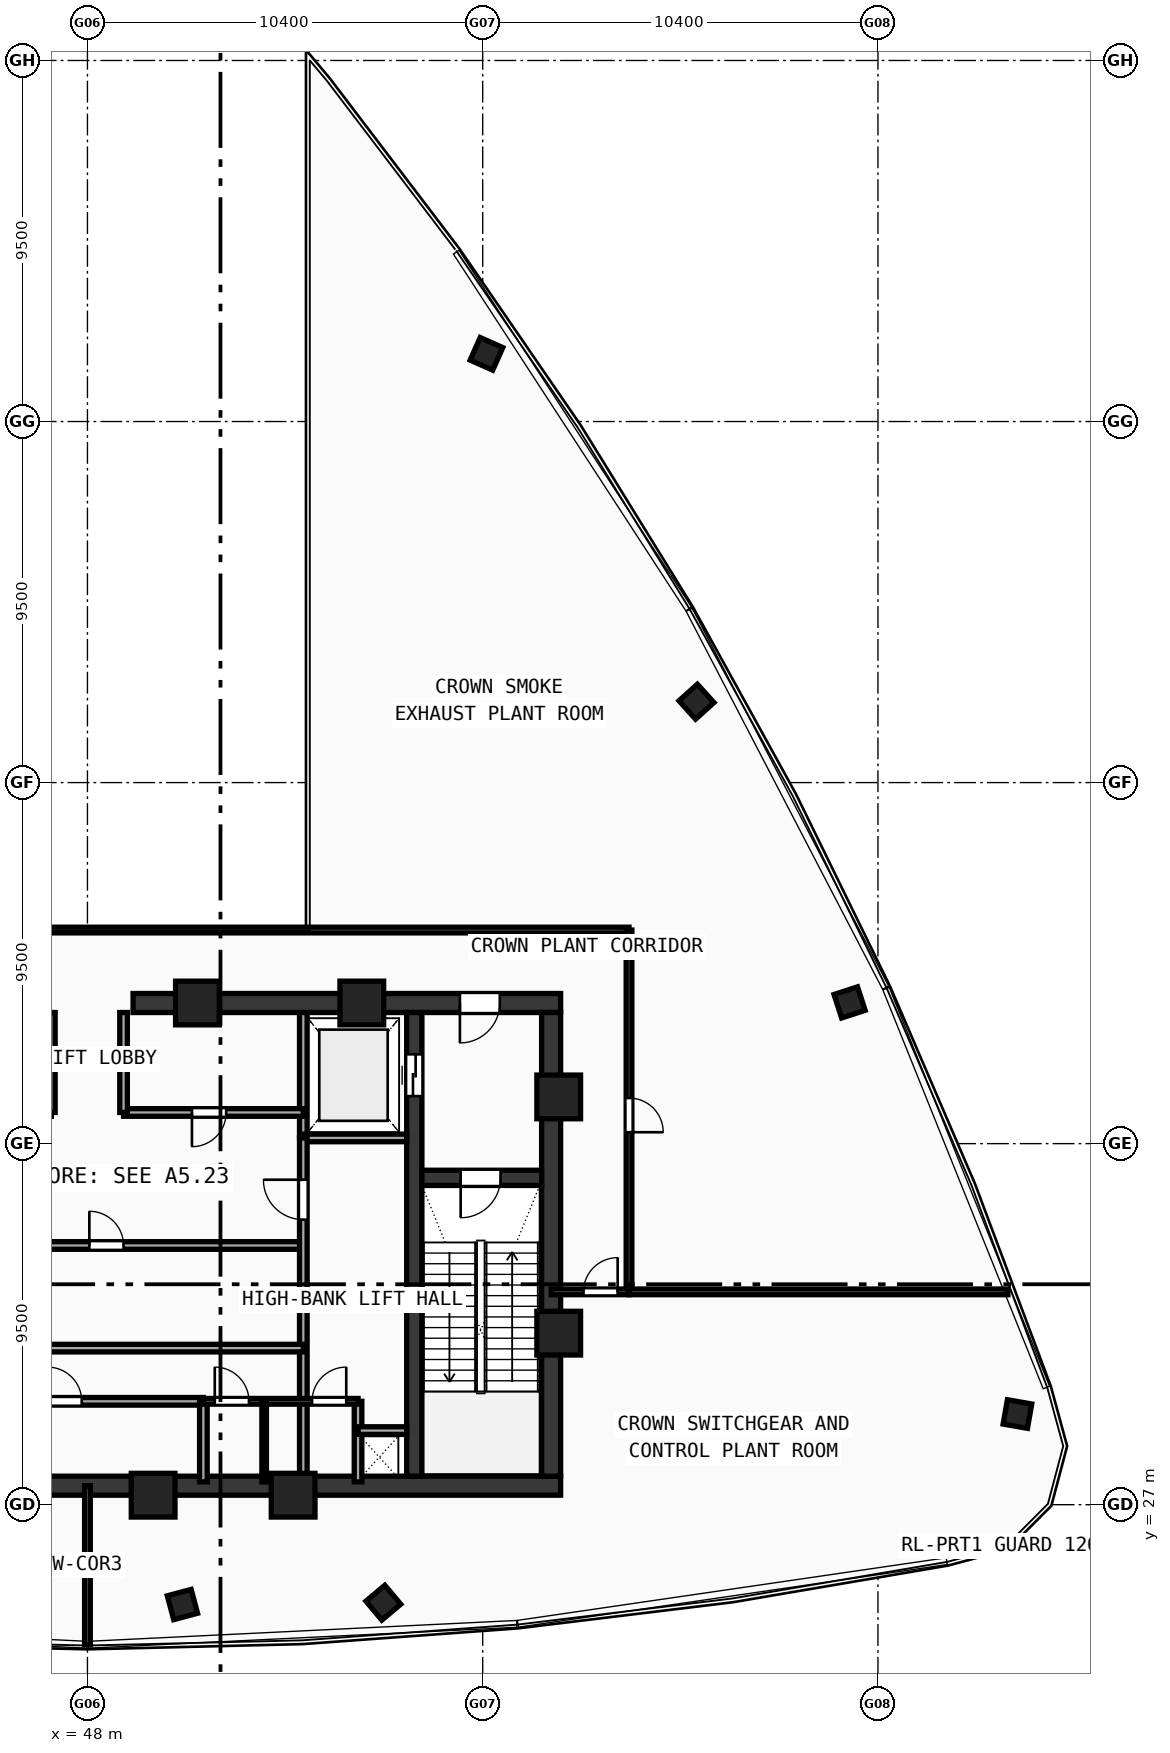
"""IFC4 building model, lengths in metres.
Left out: names, types, materials, properties, quantities, classifications, styles, units other than length and angle.
Written with IfcOpenShell. Run it as: python <this file> out.ifc"""

import sys

from ifc_helpers import new_model, si_unit, direction, frame, frame_2d, origin, origin_with_axes, origin_2d, place, context, subcontext, project, spatial, rectangle, hollow_rectangle, extrude, source, transform, mapped, element, fill, save


model = new_model("IFC4")
c1 = context("Model", 3, precision=1e-05, world=origin(), true_north=direction((0.0, 1.0)))
c2 = subcontext(c1, "Body", "Model", "MODEL_VIEW")
j1 = project(units=[si_unit("LENGTHUNIT", "METRE"), si_unit("PLANEANGLEUNIT", "RADIAN")], contexts=[c1])
p1 = place(None, origin())
s1 = spatial("IfcSite", under=j1, at=p1, CompositionType="ELEMENT")
p2 = place(p1, origin())
s2 = spatial("IfcBuilding", under=s1, at=p2, CompositionType="ELEMENT")
p3 = place(p2, frame((0.0, 0.0, 376.76)))
s3 = spatial("IfcBuildingStorey", under=s2, at=p3, CompositionType="ELEMENT", Elevation=376.76)
p4 = place(p3, frame((35.55, 27.5, 0.0), z_axis=(0.0, 0.0, 1.0), x_axis=(1.0, 0.0, 0.0)))
e1 = element("IfcWall", 1, at=p4, inside=s3, PredefinedType="SHEAR", context=c2, shape_type="SweptSolid", body=[
    extrude(rectangle(XDim=24.9, YDim=0.5, at=frame_2d((12.45, 0.0))), origin(), (0.0, 0.0, 1.0), 4.72),
])
p5 = place(p3, frame((49.2, 40.2, 0.0), z_axis=(0.0, 0.0, 1.0), x_axis=(1.0, 0.0, 0.0)))
e2 = element("IfcWall", 2, at=p5, inside=s3, PredefinedType="SHEAR", context=c2, shape_type="SweptSolid", body=[
    extrude(rectangle(XDim=11.25, YDim=0.5, at=frame_2d((5.625, 0.0))), origin(), (0.0, 0.0, 1.0), 4.72),
])
p6 = place(p5, frame((8.6, 0.0, 0.0)))
e3 = element("IfcOpeningElement", 3, at=p6, cuts=e2, PredefinedType="OPENING", context=c2, shape_type="SweptSolid", body=[
    extrude(rectangle(XDim=1.05, YDim=2.1, at=frame_2d((0.525, 1.05))), frame((0.0, 0.26, 0.0), z_axis=(0.0, -1.0, 0.0), x_axis=(1.0, 0.0, 0.0)), (0.0, 0.0, 1.0), 0.52),
])
p7 = place(p3, frame((60.2, 27.75, 0.0), z_axis=(0.0, 0.0, 1.0), x_axis=(0.0, 1.0, 0.0)))
e4 = element("IfcWall", 4, at=p7, inside=s3, PredefinedType="SHEAR", context=c2, shape_type="SweptSolid", body=[
    extrude(rectangle(XDim=12.2, YDim=0.5, at=frame_2d((6.1, 0.0))), origin(), (0.0, 0.0, 1.0), 4.72),
])
p8 = place(p3, frame((56.6, 27.75, 0.0), z_axis=(0.0, 0.0, 1.0), x_axis=(0.0, 1.0, 0.0)))
e5 = element("IfcWall", 5, at=p8, inside=s3, PredefinedType="SHEAR", context=c2, shape_type="SweptSolid", body=[
    extrude(rectangle(XDim=12.2, YDim=0.4, at=frame_2d((6.1, 0.0))), origin(), (0.0, 0.0, 1.0), 4.72),
])
p9 = place(p8, frame((10.0, 0.0, 0.0)))
e6 = element("IfcOpeningElement", 6, at=p9, cuts=e5, PredefinedType="OPENING", context=c2, shape_type="SweptSolid", body=[
    extrude(rectangle(XDim=1.1, YDim=2.1, at=frame_2d((0.55, 1.05))), frame((0.0, 0.21, 0.0), z_axis=(0.0, -1.0, 0.0), x_axis=(1.0, 0.0, 0.0)), (0.0, 0.0, 1.0), 0.42),
])
p10 = place(p3, frame((56.8, 35.6, 0.0), z_axis=(0.0, 0.0, 1.0), x_axis=(1.0, 0.0, 0.0)))
e7 = element("IfcWall", 7, at=p10, inside=s3, PredefinedType="SHEAR", context=c2, shape_type="SweptSolid", body=[
    extrude(rectangle(XDim=3.15, YDim=0.4, at=frame_2d((1.575, 0.0))), origin(), (0.0, 0.0, 1.0), 4.72),
])
p11 = place(p10, frame((1.02, 0.0, 0.0)))
e8 = element("IfcOpeningElement", 8, at=p11, cuts=e7, PredefinedType="OPENING", context=c2, shape_type="SweptSolid", body=[
    extrude(rectangle(XDim=1.05, YDim=2.1, at=frame_2d((0.525, 1.05))), frame((0.0, 0.21, 0.0), z_axis=(0.0, -1.0, 0.0), x_axis=(1.0, 0.0, 0.0)), (0.0, 0.0, 1.0), 0.42),
])
m1 = source(origin(), c2, "Body", "SweptSolid", [
    extrude(hollow_rectangle(XDim=1.15, YDim=1.15, WallThickness=0.048, at=origin_2d()), origin(), (0.0, 0.0, 1.0), 5.0),
])
for number, where, z_axis, x_axis in (
    (9, (49.729, 27.25, -0.28), (0.0, 0.0, 1.0), (1.0, 0.0, 0.0)),
    (10, (53.412, 27.25, -0.28), (0.0, 0.0, 1.0), (1.0, 0.0, 0.0)),
    (11, (60.4, 31.513, -0.28), (0.0, 0.0, 1.0), (1.0, 0.0, 0.0)),
    (12, (60.4, 37.729, -0.28), (0.0, 0.0, 1.0), (1.0, 0.0, 0.0)),
    (13, (55.219, 40.2, -0.28), (0.0, 0.0, 1.0), (1.0, 0.0, 0.0)),
    (14, (50.894, 40.2, -0.28), (0.0, 0.0, 1.0), (1.0, 0.0, 0.0)),
):
    element("IfcColumn", number, at=place(p3, frame(where, z_axis=z_axis, x_axis=x_axis)), inside=s3, PredefinedType="COLUMN", context=c2, shape_type="MappedRepresentation", body=[
        mapped(m1, transform((0.0, 0.0, 0.0), scale=1.0)),
    ])
m2 = source(origin(), c2, "Body", "SweptSolid", [
    extrude(hollow_rectangle(XDim=0.65, YDim=0.65, WallThickness=0.024, at=origin_2d()), origin(), (0.0, 0.0, 1.0), 5.0),
])
for number, where, z_axis, x_axis in (
    (15, (50.499, 24.373, -0.28), (0.0, 0.0, 1.0), (0.966, 0.259, 0.0)),
    (16, (55.785, 24.422, -0.28), (0.0, 0.0, 1.0), (0.766, 0.643, 0.0)),
    (17, (72.47, 29.385, -0.28), (0.0, 0.0, 1.0), (0.174, 0.985, 0.0)),
    (18, (68.053, 40.216, -0.28), (0.0, 0.0, 1.0), (-0.309, 0.951, 0.0)),
    (19, (64.025, 48.129, -0.28), (0.0, 0.0, 1.0), (-0.669, 0.743, 0.0)),
    (20, (58.499, 57.281, -0.28), (0.0, 0.0, 1.0), (-0.914, 0.407, 0.0)),
):
    element("IfcColumn", number, at=place(p3, frame(where, z_axis=z_axis, x_axis=x_axis)), inside=s3, PredefinedType="COLUMN", context=c2, shape_type="MappedRepresentation", body=[
        mapped(m2, transform((0.0, 0.0, 0.0), scale=1.0)),
    ])
p12 = place(p3, frame((53.68, 36.65, 0.0), z_axis=(0.0, 0.0, 1.0), x_axis=(0.0, 1.0, 0.0)))
e21 = element("IfcWall", 21, at=p12, inside=s3, PredefinedType="SOLIDWALL", context=c2, shape_type="SweptSolid", body=[
    extrude(rectangle(XDim=3.3, YDim=0.2, at=frame_2d((1.65, 0.0))), origin(), (0.0, 0.0, 1.0), 4.72),
])
p13 = place(p3, frame((53.68, 36.65, 0.0), z_axis=(0.0, 0.0, 1.0), x_axis=(1.0, 0.0, 0.0)))
e22 = element("IfcWall", 22, at=p13, inside=s3, PredefinedType="SOLIDWALL", context=c2, shape_type="SweptSolid", body=[
    extrude(rectangle(XDim=2.72, YDim=0.2, at=frame_2d((1.36, 0.0))), origin(), (0.0, 0.0, 1.0), 4.72),
])
p14 = place(p3, frame((48.95, 37.32, 0.0), z_axis=(0.0, 0.0, 1.0), x_axis=(1.0, 0.0, 0.0)))
e23 = element("IfcWall", 23, at=p14, inside=s3, PredefinedType="SOLIDWALL", context=c2, shape_type="SweptSolid", body=[
    extrude(rectangle(XDim=4.73, YDim=0.2, at=frame_2d((2.365, 0.0))), origin(), (0.0, 0.0, 1.0), 4.72),
])
p15 = place(p14, frame((1.8, 0.0, 0.0)))
e24 = element("IfcOpeningElement", 24, at=p15, cuts=e23, PredefinedType="OPENING", context=c2, shape_type="SweptSolid", body=[
    extrude(rectangle(XDim=0.9, YDim=2.1, at=frame_2d((0.45, 1.05))), frame((0.0, 0.11, 0.0), z_axis=(0.0, -1.0, 0.0), x_axis=(1.0, 0.0, 0.0)), (0.0, 0.0, 1.0), 0.22),
])
for number, where, z_axis, x_axis in (
    (25, (47.05, 37.32, 0.0), (0.0, 0.0, 1.0), (0.0, 1.0, 0.0)),
    (26, (48.95, 37.32, 0.0), (0.0, 0.0, 1.0), (0.0, 1.0, 0.0)),
):
    element("IfcWall", number, at=place(p3, frame(where, z_axis=z_axis, x_axis=x_axis)), inside=s3, PredefinedType="SOLIDWALL", context=c2, shape_type="SweptSolid", body=[
        extrude(rectangle(XDim=2.63, YDim=0.2, at=frame_2d((1.315, 0.0))), origin(), (0.0, 0.0, 1.0), 4.72),
    ])
p16 = place(p3, frame((43.85, 33.82, 0.0), z_axis=(0.0, 0.0, 1.0), x_axis=(1.0, 0.0, 0.0)))
e27 = element("IfcWall", 27, at=p16, inside=s3, PredefinedType="SOLIDWALL", context=c2, shape_type="SweptSolid", body=[
    extrude(rectangle(XDim=9.83, YDim=0.2, at=frame_2d((4.915, 0.0))), origin(), (0.0, 0.0, 1.0), 4.72),
])
p17 = place(p16, frame((4.2, 0.0, 0.0)))
e28 = element("IfcOpeningElement", 28, at=p17, cuts=e27, PredefinedType="OPENING", context=c2, shape_type="SweptSolid", body=[
    extrude(rectangle(XDim=0.9, YDim=2.1, at=frame_2d((0.45, 1.05))), frame((0.0, 0.11, 0.0), z_axis=(0.0, -1.0, 0.0), x_axis=(1.0, 0.0, 0.0)), (0.0, 0.0, 1.0), 0.22),
])
p18 = place(p3, frame((53.68, 27.6, 0.0), z_axis=(0.0, 0.0, 1.0), x_axis=(0.0, 1.0, 0.0)))
e29 = element("IfcWall", 29, at=p18, inside=s3, PredefinedType="SOLIDWALL", context=c2, shape_type="SweptSolid", body=[
    extrude(rectangle(XDim=9.05, YDim=0.2, at=frame_2d((4.525, 0.0))), origin(), (0.0, 0.0, 1.0), 4.72),
])
p19 = place(p18, frame((6.9, 0.0, 0.0)))
e30 = element("IfcOpeningElement", 30, at=p19, cuts=e29, PredefinedType="OPENING", context=c2, shape_type="SweptSolid", body=[
    extrude(rectangle(XDim=1.05, YDim=2.1, at=frame_2d((0.525, 1.05))), frame((0.0, 0.11, 0.0), z_axis=(0.0, -1.0, 0.0), x_axis=(1.0, 0.0, 0.0)), (0.0, 0.0, 1.0), 0.22),
])
p20 = place(p3, frame((43.85, 29.72, 0.0), z_axis=(0.0, 0.0, 1.0), x_axis=(1.0, 0.0, 0.0)))
e31 = element("IfcWall", 31, at=p20, inside=s3, PredefinedType="SOLIDWALL", context=c2, shape_type="SweptSolid", body=[
    extrude(rectangle(XDim=7.2, YDim=0.2, at=frame_2d((3.6, 0.0))), origin(), (0.0, 0.0, 1.0), 4.72),
])
p21 = place(p20, frame((3.1, 0.0, 0.0)))
e32 = element("IfcOpeningElement", 32, at=p21, cuts=e31, PredefinedType="OPENING", context=c2, shape_type="SweptSolid", body=[
    extrude(rectangle(XDim=0.9, YDim=2.1, at=frame_2d((0.45, 1.05))), frame((0.0, 0.11, 0.0), z_axis=(0.0, -1.0, 0.0), x_axis=(1.0, 0.0, 0.0)), (0.0, 0.0, 1.0), 0.22),
])
p22 = place(p3, frame((51.05, 27.6, 0.0), z_axis=(0.0, 0.0, 1.0), x_axis=(0.0, 1.0, 0.0)))
e33 = element("IfcWall", 33, at=p22, inside=s3, PredefinedType="SOLIDWALL", context=c2, shape_type="SweptSolid", body=[
    extrude(rectangle(XDim=2.12, YDim=0.2, at=frame_2d((1.06, 0.0))), origin(), (0.0, 0.0, 1.0), 4.72),
])
p23 = place(p3, frame((43.85, 31.12, 0.0), z_axis=(0.0, 0.0, 1.0), x_axis=(1.0, 0.0, 0.0)))
e34 = element("IfcWall", 34, at=p23, inside=s3, PredefinedType="SOLIDWALL", context=c2, shape_type="SweptSolid", body=[
    extrude(rectangle(XDim=9.83, YDim=0.2, at=frame_2d((4.915, 0.0))), origin(), (0.0, 0.0, 1.0), 4.72),
])
p24 = place(p3, frame((55.12, 27.6, 0.0), z_axis=(0.0, 0.0, 1.0), x_axis=(0.0, 1.0, 0.0)))
e35 = element("IfcWall", 35, at=p24, inside=s3, PredefinedType="SOLIDWALL", context=c2, shape_type="SweptSolid", body=[
    extrude(rectangle(XDim=2.12, YDim=0.2, at=frame_2d((1.06, 0.0))), origin(), (0.0, 0.0, 1.0), 4.72),
])
p25 = place(p3, frame((55.12, 28.95, 0.0), z_axis=(0.0, 0.0, 1.0), x_axis=(1.0, 0.0, 0.0)))
e36 = element("IfcWall", 36, at=p25, inside=s3, PredefinedType="SOLIDWALL", context=c2, shape_type="SweptSolid", body=[
    extrude(rectangle(XDim=1.28, YDim=0.2, at=frame_2d((0.64, 0.0))), origin(), (0.0, 0.0, 1.0), 4.72),
])
p26 = place(p3, frame((51.05, 29.72, 0.0), z_axis=(0.0, 0.0, 1.0), x_axis=(1.0, 0.0, 0.0)))
e37 = element("IfcWall", 37, at=p26, inside=s3, PredefinedType="PARTITIONING", context=c2, shape_type="SweptSolid", body=[
    extrude(rectangle(XDim=4.07, YDim=0.15, at=frame_2d((2.035, 0.0))), origin(), (0.0, 0.0, 1.0), 4.72),
])
p27 = place(p26, frame((0.3, 0.0, 0.0)))
e38 = element("IfcOpeningElement", 38, at=p27, cuts=e37, PredefinedType="OPENING", context=c2, shape_type="SweptSolid", body=[
    extrude(rectangle(XDim=0.9, YDim=2.1, at=frame_2d((0.45, 1.05))), frame((0.0, 0.085, 0.0), z_axis=(0.0, -1.0, 0.0), x_axis=(1.0, 0.0, 0.0)), (0.0, 0.0, 1.0), 0.17),
])
p28 = place(p26, frame((2.86, 0.0, 0.0)))
e39 = element("IfcOpeningElement", 39, at=p28, cuts=e37, PredefinedType="OPENING", context=c2, shape_type="SweptSolid", body=[
    extrude(rectangle(XDim=0.9, YDim=2.1, at=frame_2d((0.45, 1.05))), frame((0.0, 0.085, 0.0), z_axis=(0.0, -1.0, 0.0), x_axis=(1.0, 0.0, 0.0)), (0.0, 0.0, 1.0), 0.17),
])
p29 = place(p3, frame((52.65, 27.6, 0.0), z_axis=(0.0, 0.0, 1.0), x_axis=(0.0, 1.0, 0.0)))
e40 = element("IfcWall", 40, at=p29, inside=s3, PredefinedType="PARTITIONING", context=c2, shape_type="SweptSolid", body=[
    extrude(rectangle(XDim=2.12, YDim=0.12, at=frame_2d((1.06, 0.0))), origin(), (0.0, 0.0, 1.0), 4.72),
])
p30 = place(p3, frame((48.0, 23.314, 0.0), z_axis=(0.0, 0.0, 1.0), x_axis=(0.0, 1.0, 0.0)))
e41 = element("IfcWall", 41, at=p30, inside=s3, PredefinedType="PARTITIONING", context=c2, shape_type="SweptSolid", body=[
    extrude(rectangle(XDim=4.186, YDim=0.15, at=frame_2d((2.093, 0.0))), origin(), (0.0, 0.0, 1.0), 4.12),
])
p31 = place(p3, frame((35.6, 42.12, 0.0), z_axis=(0.0, 0.0, 1.0), x_axis=(1.0, 0.0, 0.0)))
e42 = element("IfcWall", 42, at=p31, inside=s3, PredefinedType="PARTITIONING", context=c2, shape_type="SweptSolid", body=[
    extrude(rectangle(XDim=26.65, YDim=0.15, at=frame_2d((13.325, 0.0))), origin(), (0.0, 0.0, 1.0), 4.12),
])
p32 = place(p3, frame((62.25, 32.6, 0.0), z_axis=(0.0, 0.0, 1.0), x_axis=(0.0, 1.0, 0.0)))
e43 = element("IfcWall", 43, at=p32, inside=s3, PredefinedType="PARTITIONING", context=c2, shape_type="SweptSolid", body=[
    extrude(rectangle(XDim=9.52, YDim=0.15, at=frame_2d((4.76, 0.0))), origin(), (0.0, 0.0, 1.0), 4.12),
])
p33 = place(p32, frame((4.2, 0.0, 0.0)))
e44 = element("IfcOpeningElement", 44, at=p33, cuts=e43, PredefinedType="OPENING", context=c2, shape_type="SweptSolid", body=[
    extrude(rectangle(XDim=0.9, YDim=2.1, at=frame_2d((0.45, 1.05))), frame((0.0, 0.085, 0.0), z_axis=(0.0, -1.0, 0.0), x_axis=(1.0, 0.0, 0.0)), (0.0, 0.0, 1.0), 0.17),
])
p34 = place(p3, frame((60.2, 32.6, 0.0), z_axis=(0.0, 0.0, 1.0), x_axis=(1.0, 0.0, 0.0)))
e45 = element("IfcWall", 45, at=p34, inside=s3, PredefinedType="PARTITIONING", context=c2, shape_type="SweptSolid", body=[
    extrude(rectangle(XDim=2.05, YDim=0.15, at=frame_2d((1.025, 0.0))), origin(), (0.0, 0.0, 1.0), 4.72),
])
p35 = place(p34, frame((0.851, 0.0, 0.0)))
e46 = element("IfcOpeningElement", 46, at=p35, cuts=e45, PredefinedType="OPENING", context=c2, shape_type="SweptSolid", body=[
    extrude(rectangle(XDim=0.9, YDim=2.1, at=frame_2d((0.45, 1.05))), frame((0.0, 0.085, 0.0), z_axis=(0.0, -1.0, 0.0), x_axis=(1.0, 0.0, 0.0)), (0.0, 0.0, 1.0), 0.17),
])
p36 = place(p3, frame((62.25, 32.6, 0.0), z_axis=(0.0, 0.0, 1.0), x_axis=(1.0, 0.0, 0.0)))
e47 = element("IfcWall", 47, at=p36, inside=s3, PredefinedType="PARTITIONING", context=c2, shape_type="SweptSolid", body=[
    extrude(rectangle(XDim=9.97, YDim=0.15, at=frame_2d((4.985, 0.0))), origin(), (0.0, 0.0, 1.0), 4.12),
])
m3 = source(origin(), c2, "Body", "SweptSolid", [
    extrude(rectangle(XDim=1.05, YDim=2.1, at=frame_2d((0.525, 1.05))), frame((0.0, 0.025, 0.0), z_axis=(0.0, -1.0, 0.0), x_axis=(1.0, 0.0, 0.0)), (0.0, 0.0, 1.0), 0.05),
])
p37 = place(p11, frame((1.05, 0.0, 0.0), z_axis=(0.0, 0.0, 1.0), x_axis=(-1.0, 0.0, 0.0)))
e48 = element("IfcDoor", 48, at=p37, inside=s3, OperationType="SINGLE_SWING_RIGHT", PredefinedType="DOOR", context=c2, shape_type="MappedRepresentation", body=[
    mapped(m3, transform((0.0, 0.0, 0.0), scale=1.0)),
])
fill(e8, e48)
p38 = place(p6, frame((1.05, 0.0, 0.0), z_axis=(0.0, 0.0, 1.0), x_axis=(-1.0, 0.0, 0.0)))
e49 = element("IfcDoor", 49, at=p38, inside=s3, OperationType="SINGLE_SWING_RIGHT", PredefinedType="DOOR", context=c2, shape_type="MappedRepresentation", body=[
    mapped(m3, transform((0.0, 0.0, 0.0), scale=1.0)),
])
fill(e3, e49)
m4 = source(origin(), c2, "Body", "SweptSolid", [
    extrude(rectangle(XDim=1.1, YDim=2.1, at=frame_2d((0.55, 1.05))), frame((0.0, 0.025, 0.0), z_axis=(0.0, -1.0, 0.0), x_axis=(1.0, 0.0, 0.0)), (0.0, 0.0, 1.0), 0.05),
])
p39 = place(p9, origin_with_axes())
e50 = element("IfcDoor", 50, at=p39, inside=s3, OperationType="DOUBLE_DOOR_SLIDING", PredefinedType="DOOR", context=c2, shape_type="MappedRepresentation", body=[
    mapped(m4, transform((0.0, 0.0, 0.0), scale=1.0)),
])
fill(e6, e50)
m5 = source(origin(), c2, "Body", "SweptSolid", [
    extrude(rectangle(XDim=0.9, YDim=2.1, at=frame_2d((0.45, 1.05))), frame((0.0, 0.025, 0.0), z_axis=(0.0, -1.0, 0.0), x_axis=(1.0, 0.0, 0.0)), (0.0, 0.0, 1.0), 0.05),
])
p40 = place(p15, frame((0.9, 0.0, 0.0), z_axis=(0.0, 0.0, 1.0), x_axis=(-1.0, 0.0, 0.0)))
e51 = element("IfcDoor", 51, at=p40, inside=s3, OperationType="SINGLE_SWING_RIGHT", PredefinedType="DOOR", context=c2, shape_type="MappedRepresentation", body=[
    mapped(m5, transform((0.0, 0.0, 0.0), scale=1.0)),
])
fill(e24, e51)
p41 = place(p17, origin_with_axes())
e52 = element("IfcDoor", 52, at=p41, inside=s3, OperationType="SINGLE_SWING_LEFT", PredefinedType="DOOR", context=c2, shape_type="MappedRepresentation", body=[
    mapped(m5, transform((0.0, 0.0, 0.0), scale=1.0)),
])
fill(e28, e52)
p42 = place(p19, origin_with_axes())
e53 = element("IfcDoor", 53, at=p42, inside=s3, OperationType="SINGLE_SWING_RIGHT", PredefinedType="DOOR", context=c2, shape_type="MappedRepresentation", body=[
    mapped(m3, transform((0.0, 0.0, 0.0), scale=1.0)),
])
fill(e30, e53)
p43 = place(p21, origin_with_axes())
e54 = element("IfcDoor", 54, at=p43, inside=s3, OperationType="SINGLE_SWING_LEFT", PredefinedType="DOOR", context=c2, shape_type="MappedRepresentation", body=[
    mapped(m5, transform((0.0, 0.0, 0.0), scale=1.0)),
])
fill(e32, e54)
p44 = place(p27, origin_with_axes())
e55 = element("IfcDoor", 55, at=p44, inside=s3, OperationType="SINGLE_SWING_LEFT", PredefinedType="DOOR", context=c2, shape_type="MappedRepresentation", body=[
    mapped(m5, transform((0.0, 0.0, 0.0), scale=1.0)),
])
fill(e38, e55)
p45 = place(p28, origin_with_axes())
e56 = element("IfcDoor", 56, at=p45, inside=s3, OperationType="SINGLE_SWING_RIGHT", PredefinedType="DOOR", context=c2, shape_type="MappedRepresentation", body=[
    mapped(m5, transform((0.0, 0.0, 0.0), scale=1.0)),
])
fill(e39, e56)
p46 = place(p33, frame((0.9, 0.0, 0.0), z_axis=(0.0, 0.0, 1.0), x_axis=(-1.0, 0.0, 0.0)))
e57 = element("IfcDoor", 57, at=p46, inside=s3, OperationType="SINGLE_SWING_RIGHT", PredefinedType="DOOR", context=c2, shape_type="MappedRepresentation", body=[
    mapped(m5, transform((0.0, 0.0, 0.0), scale=1.0)),
])
fill(e44, e57)
p47 = place(p35, origin_with_axes())
e58 = element("IfcDoor", 58, at=p47, inside=s3, OperationType="SINGLE_SWING_RIGHT", PredefinedType="DOOR", context=c2, shape_type="MappedRepresentation", body=[
    mapped(m5, transform((0.0, 0.0, 0.0), scale=1.0)),
])
fill(e46, e58)
save(model, sys.argv[1])
